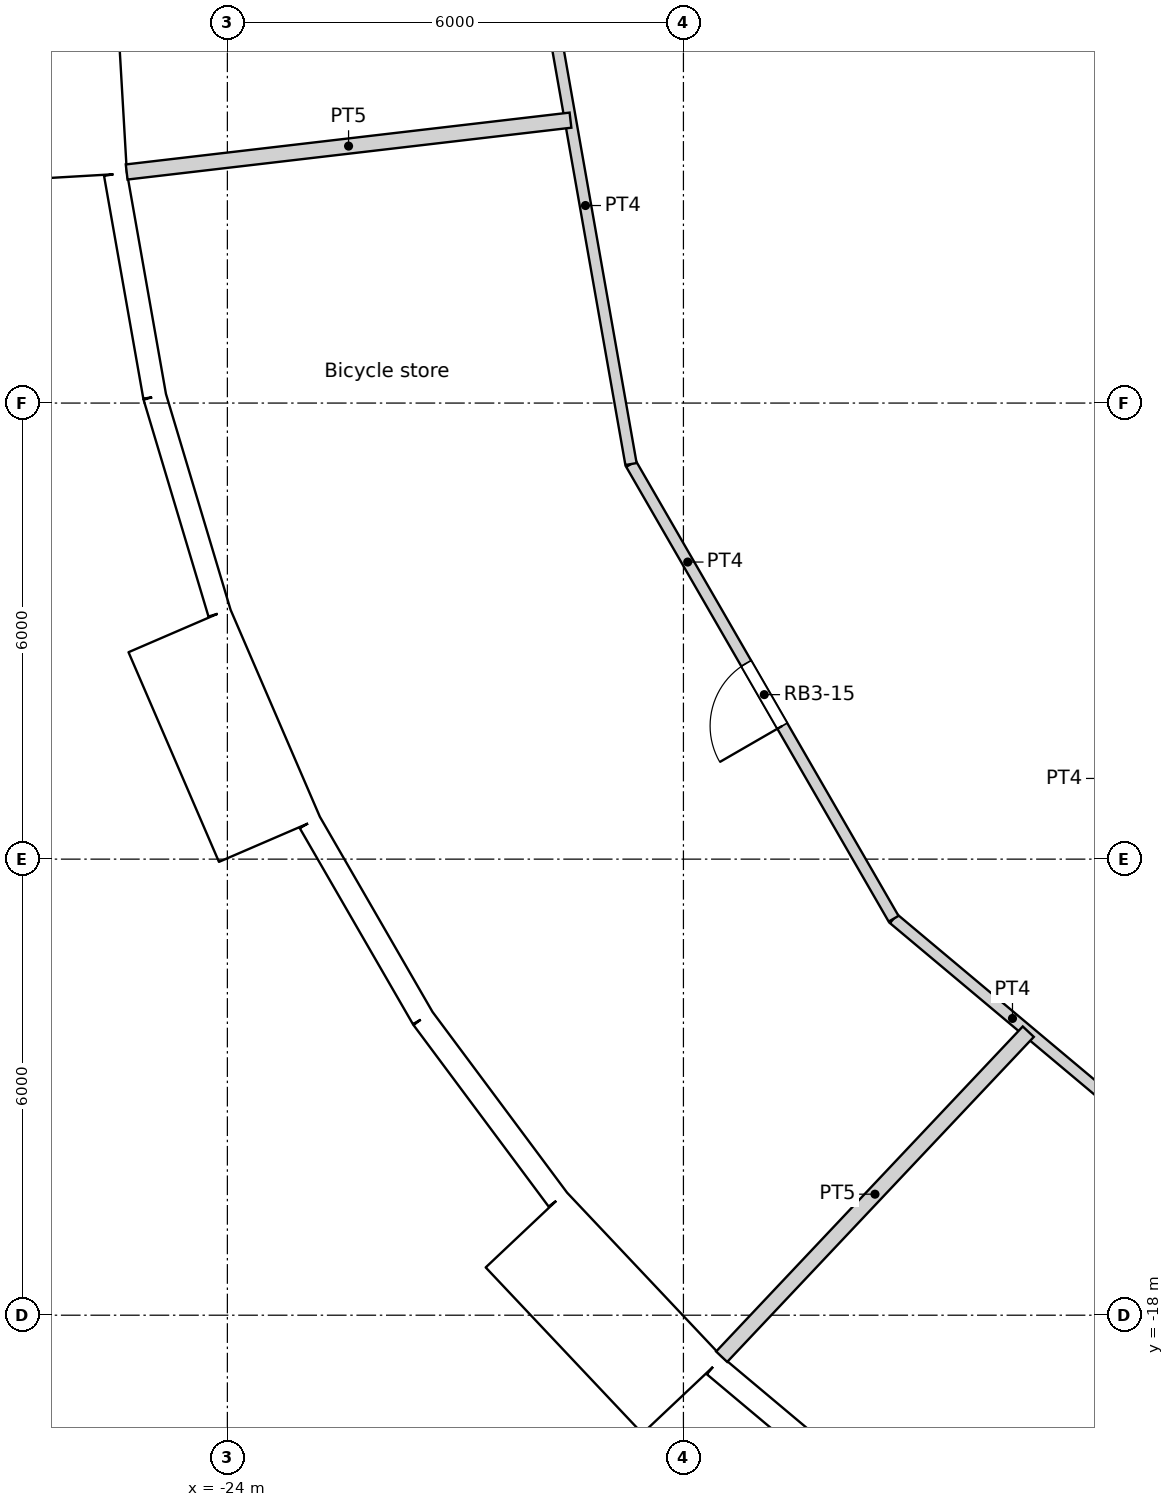
"""IFC4 building model, lengths in metres.
Left out: names, types, materials, properties, quantities, classifications, styles, units other than length and angle.
Written with IfcOpenShell. Run it as: python <this file> out.ifc"""

import sys

from ifc_helpers import new_model, si_unit, direction, frame, frame_2d, origin, origin_2d, place, context, subcontext, project, spatial, rectangle, circle, extrude, element, fill, save


model = new_model("IFC4")
c1 = context("Model", 3, precision=1e-05, world=origin(), true_north=direction((0.0, 1.0)))
c2 = subcontext(c1, "Body", "Model", "MODEL_VIEW")
j1 = project(units=[si_unit("LENGTHUNIT", "METRE"), si_unit("PLANEANGLEUNIT", "RADIAN")], contexts=[c1])
p1 = place(None, origin())
s1 = spatial("IfcSite", under=j1, at=p1, CompositionType="ELEMENT")
p2 = place(p1, origin())
s2 = spatial("IfcBuilding", under=s1, at=p2, CompositionType="ELEMENT")
p3 = place(p2, frame((0.0, 0.0, 147.6)))
s3 = spatial("IfcBuildingStorey", under=s2, at=p3, CompositionType="ELEMENT", Elevation=147.6)
for number, where, z_axis, x_axis in (
    (1, (-24.382, -2.85, 0.0), (0.0, 0.0, 1.0), (1.0, 0.0, 0.0)),
    (2, (-23.067, -8.396, 0.0), (0.0, 0.0, 1.0), (1.0, 0.0, 0.0)),
    (3, (-20.509, -13.489, 0.0), (0.0, 0.0, 1.0), (1.0, 0.0, 0.0)),
    (4, (-16.846, -17.855, 0.0), (0.0, 0.0, 1.0), (1.0, 0.0, 0.0)),
):
    element("IfcColumn", number, at=place(p3, frame(where, z_axis=z_axis, x_axis=x_axis)), inside=s3, PredefinedType="COLUMN", context=c2, shape_type="SweptSolid", body=[
        extrude(circle(Radius=0.6, at=origin_2d()), origin(), (0.0, 0.0, 1.0), 3.6),
    ])
for number, where, z_axis, x_axis in (
    (5, (-18.612, -2.805, 0.0), (0.0, 0.0, 1.0), (1.0, 0.0, 0.0)),
    (6, (-16.958, -8.167, 0.0), (0.0, 0.0, 1.0), (1.0, 0.0, 0.0)),
    (7, (-13.798, -12.802, 0.0), (0.0, 0.0, 1.0), (1.0, 0.0, 0.0)),
):
    element("IfcColumn", number, at=place(p3, frame(where, z_axis=z_axis, x_axis=x_axis)), inside=s3, PredefinedType="COLUMN", context=c2, shape_type="SweptSolid", body=[
        extrude(circle(Radius=0.65, at=origin_2d()), origin(), (0.0, 0.0, 1.0), 3.6),
    ])
p4 = place(p3, frame((-26.222, -0.025, -0.3), z_axis=(0.0, 0.0, 1.0), x_axis=(0.058106596105, -0.998310384344, 0.0)))
e8 = element("IfcWall", 8, at=p4, inside=s3, PredefinedType="ELEMENTEDWALL", context=c2, shape_type="SweptSolid", body=[
    extrude(rectangle(XDim=3.0, YDim=1.45, at=frame_2d((1.5, 0.0))), origin(), (0.0, 0.0, 1.0), 3.6),
])
p5 = place(p4, frame((1.5, 0.0, 1.85)))
e9 = element("IfcOpeningElement", 9, at=p5, cuts=e8, PredefinedType="OPENING", context=c2, shape_type="SweptSolid", body=[
    extrude(circle(Radius=0.9, at=origin_2d()), frame((0.0, 0.735, 0.0), z_axis=(0.0, -1.0, 0.0), x_axis=(1.0, 0.0, 0.0)), (0.0, 0.0, 1.0), 1.47),
])
p6 = place(p3, frame((-25.472, -2.987, 0.0), z_axis=(0.0, 0.0, 1.0), x_axis=(0.173686952598, -0.984800915159, 0.0)))
e10 = element("IfcWall", 10, at=p6, inside=s3, PredefinedType="SOLIDWALL", context=c2, shape_type="SweptSolid", body=[
    extrude(rectangle(XDim=2.973, YDim=0.3, at=frame_2d((1.486, 0.0))), origin(), (0.0, 0.0, 1.0), 3.3),
])
p7 = place(p6, frame((1.486, 0.0, 1.55)))
e11 = element("IfcOpeningElement", 11, at=p7, cuts=e10, PredefinedType="OPENING", context=c2, shape_type="SweptSolid", body=[
    extrude(circle(Radius=0.9, at=origin_2d()), frame((0.0, 0.16, 0.0), z_axis=(0.0, -1.0, 0.0), x_axis=(1.0, 0.0, 0.0)), (0.0, 0.0, 1.0), 0.32),
])
p8 = place(p3, frame((-24.956, -5.915, 0.0), z_axis=(0.0, 0.0, 1.0), x_axis=(0.286782750849, -0.957995643944, 0.0)))
e12 = element("IfcWall", 12, at=p8, inside=s3, PredefinedType="SOLIDWALL", context=c2, shape_type="SweptSolid", body=[
    extrude(rectangle(XDim=2.973, YDim=0.3, at=frame_2d((1.486, 0.0))), origin(), (0.0, 0.0, 1.0), 3.3),
])
p9 = place(p8, frame((1.486, 0.0, 1.55)))
e13 = element("IfcOpeningElement", 13, at=p9, cuts=e12, PredefinedType="OPENING", context=c2, shape_type="SweptSolid", body=[
    extrude(circle(Radius=0.9, at=origin_2d()), frame((0.0, 0.16, 0.0), z_axis=(0.0, -1.0, 0.0), x_axis=(1.0, 0.0, 0.0)), (0.0, 0.0, 1.0), 0.32),
])
p10 = place(p3, frame((-24.632, -8.992, -0.3), z_axis=(0.0, 0.0, 1.0), x_axis=(0.396079003245, -0.918216435917, 0.0)))
e14 = element("IfcWall", 14, at=p10, inside=s3, PredefinedType="ELEMENTEDWALL", context=c2, shape_type="SweptSolid", body=[
    extrude(rectangle(XDim=3.0, YDim=1.45, at=frame_2d((1.5, 0.0))), origin(), (0.0, 0.0, 1.0), 3.6),
])
p11 = place(p10, frame((1.5, 0.0, 1.85)))
e15 = element("IfcOpeningElement", 15, at=p11, cuts=e14, PredefinedType="OPENING", context=c2, shape_type="SweptSolid", body=[
    extrude(circle(Radius=0.9, at=origin_2d()), frame((0.0, 0.735, 0.0), z_axis=(0.0, -1.0, 0.0), x_axis=(1.0, 0.0, 0.0)), (0.0, 0.0, 1.0), 1.47),
])
p12 = place(p3, frame((-22.915, -11.519, 0.0), z_axis=(0.0, 0.0, 1.0), x_axis=(0.499954672104, -0.866051572276, 0.0)))
e16 = element("IfcWall", 16, at=p12, inside=s3, PredefinedType="SOLIDWALL", context=c2, shape_type="SweptSolid", body=[
    extrude(rectangle(XDim=2.973, YDim=0.3, at=frame_2d((1.486, 0.0))), origin(), (0.0, 0.0, 1.0), 3.3),
])
p13 = place(p12, frame((1.486, 0.0, 1.55)))
e17 = element("IfcOpeningElement", 17, at=p13, cuts=e16, PredefinedType="OPENING", context=c2, shape_type="SweptSolid", body=[
    extrude(circle(Radius=0.9, at=origin_2d()), frame((0.0, 0.16, 0.0), z_axis=(0.0, -1.0, 0.0), x_axis=(1.0, 0.0, 0.0)), (0.0, 0.0, 1.0), 0.32),
])
p14 = place(p3, frame((-21.428, -14.094, 0.0), z_axis=(0.0, 0.0, 1.0), x_axis=(0.597197580538, -0.80209416517, 0.0)))
e18 = element("IfcWall", 18, at=p14, inside=s3, PredefinedType="SOLIDWALL", context=c2, shape_type="SweptSolid", body=[
    extrude(rectangle(XDim=2.973, YDim=0.3, at=frame_2d((1.486, 0.0))), origin(), (0.0, 0.0, 1.0), 3.3),
])
p15 = place(p14, frame((1.486, 0.0, 1.55)))
e19 = element("IfcOpeningElement", 19, at=p15, cuts=e18, PredefinedType="OPENING", context=c2, shape_type="SweptSolid", body=[
    extrude(circle(Radius=0.9, at=origin_2d()), frame((0.0, 0.16, 0.0), z_axis=(0.0, -1.0, 0.0), x_axis=(1.0, 0.0, 0.0)), (0.0, 0.0, 1.0), 0.32),
])
p16 = place(p3, frame((-20.071, -16.874, -0.3), z_axis=(0.0, 0.0, 1.0), x_axis=(0.686217177108, -0.727396718334, 0.0)))
e20 = element("IfcWall", 20, at=p16, inside=s3, PredefinedType="ELEMENTEDWALL", context=c2, shape_type="SweptSolid", body=[
    extrude(rectangle(XDim=3.0, YDim=1.45, at=frame_2d((1.5, 0.0))), origin(), (0.0, 0.0, 1.0), 3.6),
])
p17 = place(p16, frame((1.5, 0.0, 1.85)))
e21 = element("IfcOpeningElement", 21, at=p17, cuts=e20, PredefinedType="OPENING", context=c2, shape_type="SweptSolid", body=[
    extrude(circle(Radius=0.9, at=origin_2d()), frame((0.0, 0.735, 0.0), z_axis=(0.0, -1.0, 0.0), x_axis=(1.0, 0.0, 0.0)), (0.0, 0.0, 1.0), 1.47),
])
p18 = place(p3, frame((-17.593, -18.661, 0.0), z_axis=(0.0, 0.0, 1.0), x_axis=(0.766008913364, -0.642829950023, 0.0)))
e22 = element("IfcWall", 22, at=p18, inside=s3, PredefinedType="SOLIDWALL", context=c2, shape_type="SweptSolid", body=[
    extrude(rectangle(XDim=2.973, YDim=0.3, at=frame_2d((1.486, 0.0))), origin(), (0.0, 0.0, 1.0), 3.3),
])
p19 = place(p18, frame((1.486, 0.0, 1.55)))
e23 = element("IfcOpeningElement", 23, at=p19, cuts=e22, PredefinedType="OPENING", context=c2, shape_type="SweptSolid", body=[
    extrude(circle(Radius=0.9, at=origin_2d()), frame((0.0, 0.16, 0.0), z_axis=(0.0, -1.0, 0.0), x_axis=(1.0, 0.0, 0.0)), (0.0, 0.0, 1.0), 0.32),
])
p20 = place(p3, frame((-19.888, 0.0, 0.0), z_axis=(0.0, 0.0, 1.0), x_axis=(0.173482860149, -0.984836888644, 0.0)))
e24 = element("IfcWall", 24, at=p20, inside=s3, PredefinedType="PARTITIONING", context=c2, shape_type="SweptSolid", body=[
    extrude(rectangle(XDim=6.907, YDim=0.15, at=frame_2d((3.454, 0.0))), origin(), (0.0, 0.0, 1.0), 3.3),
])
p21 = place(p3, frame((-15.235, -12.784, 0.0), z_axis=(0.0, 0.0, 1.0), x_axis=(0.766192104565, -0.642611592567, 0.0)))
e25 = element("IfcWall", 25, at=p21, inside=s3, PredefinedType="PARTITIONING", context=c2, shape_type="SweptSolid", body=[
    extrude(rectangle(XDim=6.906, YDim=0.15, at=frame_2d((3.453, 0.0))), origin(), (0.0, 0.0, 1.0), 3.3),
])
p22 = place(p21, frame((4.133, 0.0, 0.0)))
e26 = element("IfcOpeningElement", 26, at=p22, cuts=e25, PredefinedType="OPENING", context=c2, shape_type="SweptSolid", body=[
    extrude(rectangle(XDim=0.95, YDim=2.1, at=frame_2d((0.475, 1.05))), frame((0.0, 0.075, 0.0), z_axis=(0.0, -1.0, 0.0), x_axis=(1.0, 0.0, 0.0)), (0.0, 0.0, 1.0), 0.15),
])
p23 = place(p3, frame((-18.688, -6.802, 0.0), z_axis=(0.0, 0.0, 1.0), x_axis=(0.499914202267, -0.866074933462, 0.0)))
e27 = element("IfcWall", 27, at=p23, inside=s3, PredefinedType="PARTITIONING", context=c2, shape_type="SweptSolid", body=[
    extrude(rectangle(XDim=6.907, YDim=0.15, at=frame_2d((3.454, 0.0))), origin(), (0.0, 0.0, 1.0), 3.3),
])
p24 = place(p23, frame((3.028, 0.0, 0.0)))
e28 = element("IfcOpeningElement", 28, at=p24, cuts=e27, PredefinedType="OPENING", context=c2, shape_type="SweptSolid", body=[
    extrude(rectangle(XDim=0.95, YDim=2.1, at=frame_2d((0.475, 1.05))), frame((0.0, 0.075, 0.0), z_axis=(0.0, -1.0, 0.0), x_axis=(1.0, 0.0, 0.0)), (0.0, 0.0, 1.0), 0.15),
])
for number, where, z_axis, x_axis in (
    (29, (-25.325, -2.96, 0.0), (0.0, 0.0, 1.0), (0.993, 0.116, 0.0)),
    (30, (-17.497, -18.546, 0.0), (0.0, 0.0, 1.0), (0.686, 0.727, 0.0)),
):
    element("IfcWall", number, at=place(p3, frame(where, z_axis=z_axis, x_axis=x_axis)), inside=s3, PredefinedType="PARTITIONING", context=c2, shape_type="SweptSolid", body=[
        extrude(rectangle(XDim=5.879, YDim=0.2, at=frame_2d((2.939, 0.0))), origin(), (0.0, 0.0, 1.0), 3.3),
    ])
p25 = place(p5, origin())
e31 = element("IfcWindow", 31, at=p25, inside=s3, PartitioningType="SINGLE_PANEL", PredefinedType="WINDOW", context=c2, shape_type="SweptSolid", body=[
    extrude(circle(Radius=0.9, at=origin_2d()), frame((0.0, 0.695, 0.0), z_axis=(0.0, -1.0, 0.0), x_axis=(1.0, 0.0, 0.0)), (0.0, 0.0, 1.0), 0.1),
])
fill(e9, e31)
p26 = place(p7, origin())
e32 = element("IfcWindow", 32, at=p26, inside=s3, PartitioningType="SINGLE_PANEL", PredefinedType="WINDOW", context=c2, shape_type="SweptSolid", body=[
    extrude(circle(Radius=0.9, at=origin_2d()), frame((0.0, 0.12, 0.0), z_axis=(0.0, -1.0, 0.0), x_axis=(1.0, 0.0, 0.0)), (0.0, 0.0, 1.0), 0.1),
])
fill(e11, e32)
p27 = place(p9, origin())
e33 = element("IfcWindow", 33, at=p27, inside=s3, PartitioningType="SINGLE_PANEL", PredefinedType="WINDOW", context=c2, shape_type="SweptSolid", body=[
    extrude(circle(Radius=0.9, at=origin_2d()), frame((0.0, 0.12, 0.0), z_axis=(0.0, -1.0, 0.0), x_axis=(1.0, 0.0, 0.0)), (0.0, 0.0, 1.0), 0.1),
])
fill(e13, e33)
p28 = place(p11, origin())
e34 = element("IfcWindow", 34, at=p28, inside=s3, PartitioningType="SINGLE_PANEL", PredefinedType="WINDOW", context=c2, shape_type="SweptSolid", body=[
    extrude(circle(Radius=0.9, at=origin_2d()), frame((0.0, 0.695, 0.0), z_axis=(0.0, -1.0, 0.0), x_axis=(1.0, 0.0, 0.0)), (0.0, 0.0, 1.0), 0.1),
])
fill(e15, e34)
p29 = place(p13, origin())
e35 = element("IfcWindow", 35, at=p29, inside=s3, PartitioningType="SINGLE_PANEL", PredefinedType="WINDOW", context=c2, shape_type="SweptSolid", body=[
    extrude(circle(Radius=0.9, at=origin_2d()), frame((0.0, 0.12, 0.0), z_axis=(0.0, -1.0, 0.0), x_axis=(1.0, 0.0, 0.0)), (0.0, 0.0, 1.0), 0.1),
])
fill(e17, e35)
p30 = place(p15, origin())
e36 = element("IfcWindow", 36, at=p30, inside=s3, PartitioningType="SINGLE_PANEL", PredefinedType="WINDOW", context=c2, shape_type="SweptSolid", body=[
    extrude(circle(Radius=0.9, at=origin_2d()), frame((0.0, 0.12, 0.0), z_axis=(0.0, -1.0, 0.0), x_axis=(1.0, 0.0, 0.0)), (0.0, 0.0, 1.0), 0.1),
])
fill(e19, e36)
p31 = place(p17, origin())
e37 = element("IfcWindow", 37, at=p31, inside=s3, PartitioningType="SINGLE_PANEL", PredefinedType="WINDOW", context=c2, shape_type="SweptSolid", body=[
    extrude(circle(Radius=0.9, at=origin_2d()), frame((0.0, 0.695, 0.0), z_axis=(0.0, -1.0, 0.0), x_axis=(1.0, 0.0, 0.0)), (0.0, 0.0, 1.0), 0.1),
])
fill(e21, e37)
p32 = place(p19, origin())
e38 = element("IfcWindow", 38, at=p32, inside=s3, PartitioningType="SINGLE_PANEL", PredefinedType="WINDOW", context=c2, shape_type="SweptSolid", body=[
    extrude(circle(Radius=0.9, at=origin_2d()), frame((0.0, 0.12, 0.0), z_axis=(0.0, -1.0, 0.0), x_axis=(1.0, 0.0, 0.0)), (0.0, 0.0, 1.0), 0.1),
])
fill(e23, e38)
p33 = place(p24, origin())
e39 = element("IfcDoor", 39, at=p33, inside=s3, OperationType="SINGLE_SWING_LEFT", PredefinedType="DOOR", context=c2, shape_type="SweptSolid", body=[
    extrude(rectangle(XDim=0.95, YDim=2.1, at=frame_2d((0.475, 1.05))), frame((0.0, 0.025, 0.0), z_axis=(0.0, -1.0, 0.0), x_axis=(1.0, 0.0, 0.0)), (0.0, 0.0, 1.0), 0.05),
])
fill(e28, e39)
save(model, sys.argv[1])
